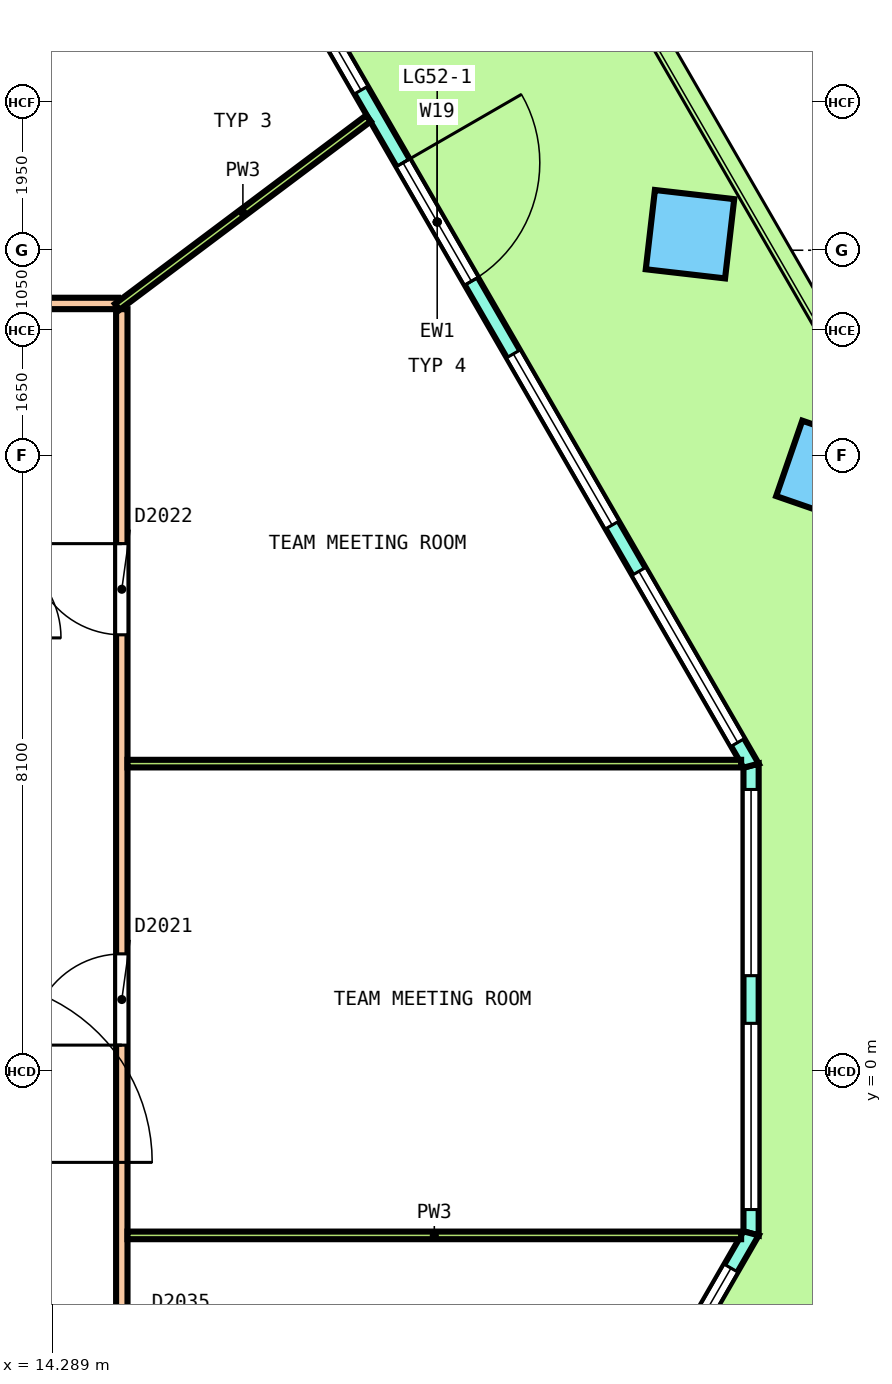
"""IFC4 building model, lengths in metres.
Left out: names, types, materials, properties, quantities, classifications, styles, units other than length and angle.
Written with IfcOpenShell. Run it as: python <this file> out.ifc"""

import sys

from ifc_helpers import new_model, si_unit, direction, frame, frame_2d, origin, origin_2d, place, context, subcontext, project, spatial, polyline, rectangle, outline, extrude, element, fill, save


model = new_model("IFC4")
c1 = context("Model", 3, precision=1e-05, world=origin(), true_north=direction((0.0, 1.0)))
c2 = subcontext(c1, "Body", "Model", "MODEL_VIEW")
j1 = project(units=[si_unit("LENGTHUNIT", "METRE"), si_unit("PLANEANGLEUNIT", "RADIAN")], contexts=[c1])
p1 = place(None, origin())
s1 = spatial("IfcSite", under=j1, at=p1, CompositionType="ELEMENT")
p2 = place(p1, origin())
s2 = spatial("IfcBuilding", under=s1, at=p2, CompositionType="ELEMENT")
p3 = place(p2, frame((0.0, 0.0, 241.4)))
s3 = spatial("IfcBuildingStorey", under=s2, at=p3, CompositionType="ELEMENT", Elevation=241.4)
p4 = place(p3, frame((24.477, 7.89, 0.0), z_axis=(0.021792529504, 0.025068093754, 0.999448185917), x_axis=(-0.49894916392, 0.866563260977, -0.010855715031)))
e1 = element("IfcColumn", 1, at=p4, inside=s3, PredefinedType="COLUMN", context=c2, shape_type="SweptSolid", body=[
    extrude(rectangle(XDim=1.05, YDim=1.05, at=origin_2d()), origin(), (0.0, 0.0, 1.0), 3.652),
])
p5 = place(p3, frame((22.675, 11.011, 0.0), z_axis=(0.025336830513, 0.018852206345, 0.999501195265), x_axis=(-0.501175751069, 0.865337958787, -0.003617128936)))
e2 = element("IfcColumn", 2, at=p5, inside=s3, PredefinedType="COLUMN", context=c2, shape_type="SweptSolid", body=[
    extrude(rectangle(XDim=1.05, YDim=1.05, at=origin_2d()), origin(), (0.0, 0.0, 1.0), 3.652),
])
p6 = place(p3, frame((23.479, -2.134, 0.0), z_axis=(0.0, 0.0, 1.0), x_axis=(0.0, 1.0, 0.0)))
e3 = element("IfcWall", 3, at=p6, inside=s3, PredefinedType="SOLIDWALL", context=c2, shape_type="SweptSolid", body=[
    extrude(outline(polyline([(-0.027, -0.1), (1.008, -0.1), (2.042, -0.1), (3.077, -0.1), (4.111, -0.1), (5.146, -0.1), (6.18, -0.1), (6.126, 0.1), (5.11, 0.1), (4.093, 0.1), (3.077, 0.1), (2.06, 0.1), (1.043, 0.1), (0.027, 0.1), (-0.027, -0.1)])), origin(), (0.0, 0.0, 1.0), 3.7),
])
p7 = place(p6, frame((0.313, 0.0, 0.1)))
e4 = element("IfcOpeningElement", 4, at=p7, cuts=e3, PredefinedType="OPENING", context=c2, shape_type="SweptSolid", body=[
    extrude(rectangle(XDim=2.45, YDim=2.65, at=frame_2d((1.225, 1.325))), frame((0.0, 0.11, 0.0), z_axis=(0.0, -1.0, 0.0), x_axis=(1.0, 0.0, 0.0)), (0.0, 0.0, 1.0), 0.22),
])
p8 = place(p6, frame((3.39, 0.0, 0.1)))
e5 = element("IfcOpeningElement", 5, at=p8, cuts=e3, PredefinedType="OPENING", context=c2, shape_type="SweptSolid", body=[
    extrude(rectangle(XDim=2.45, YDim=2.65, at=frame_2d((1.225, 1.325))), frame((0.0, 0.11, 0.0), z_axis=(0.0, -1.0, 0.0), x_axis=(1.0, 0.0, 0.0)), (0.0, 0.0, 1.0), 0.22),
])
p9 = place(p3, frame((23.479, 4.019, 0.0), z_axis=(0.0, 0.0, 1.0), x_axis=(-0.500000529106, 0.866025098304, 0.0)))
e6 = element("IfcWall", 6, at=p9, inside=s3, PredefinedType="SOLIDWALL", context=c2, shape_type="SweptSolid", body=[
    extrude(outline(polyline([(-0.027, -0.1), (1.009, -0.1), (2.044, -0.1), (3.08, -0.1), (4.116, -0.1), (5.152, -0.1), (6.187, -0.1), (7.223, -0.1), (8.259, -0.1), (9.294, -0.1), (10.33, -0.1), (11.365, -0.1), (12.401, -0.1), (13.437, -0.1), (14.473, -0.1), (15.508, -0.1), (16.544, -0.1), (16.49, 0.1), (15.461, 0.1), (14.432, 0.1), (13.403, 0.1), (12.375, 0.1), (11.345, 0.1), (10.316, 0.1), (9.288, 0.1), (8.259, 0.1), (7.229, 0.1), (6.201, 0.1), (5.172, 0.1), (4.143, 0.1), (3.114, 0.1), (2.085, 0.1), (1.056, 0.1), (0.027, 0.1), (-0.027, -0.1)])), origin(), (0.0, 0.0, 1.0), 3.7),
])
p10 = place(p9, frame((0.352, 0.0, 0.1)))
e7 = element("IfcOpeningElement", 7, at=p10, cuts=e6, PredefinedType="OPENING", context=c2, shape_type="SweptSolid", body=[
    extrude(rectangle(XDim=2.6, YDim=2.65, at=frame_2d((1.3, 1.325))), frame((0.0, 0.11, 0.0), z_axis=(0.0, -1.0, 0.0), x_axis=(1.0, 0.0, 0.0)), (0.0, 0.0, 1.0), 0.22),
])
p11 = place(p9, frame((3.655, 0.0, 0.1)))
e8 = element("IfcOpeningElement", 8, at=p11, cuts=e6, PredefinedType="OPENING", context=c2, shape_type="SweptSolid", body=[
    extrude(rectangle(XDim=2.6, YDim=2.65, at=frame_2d((1.3, 1.325))), frame((0.0, 0.11, 0.0), z_axis=(0.0, -1.0, 0.0), x_axis=(1.0, 0.0, 0.0)), (0.0, 0.0, 1.0), 0.22),
])
p12 = place(p9, frame((7.359, 0.0, 0.0)))
e9 = element("IfcOpeningElement", 9, at=p12, cuts=e6, PredefinedType="OPENING", context=c2, shape_type="SweptSolid", body=[
    extrude(rectangle(XDim=1.8, YDim=2.4, at=frame_2d((0.9, 1.2))), frame((0.0, 0.11, 0.0), z_axis=(0.0, -1.0, 0.0), x_axis=(1.0, 0.0, 0.0)), (0.0, 0.0, 1.0), 0.22),
])
p13 = place(p9, frame((7.359, 0.0, 2.55)))
e10 = element("IfcOpeningElement", 10, at=p13, cuts=e6, PredefinedType="OPENING", context=c2, shape_type="SweptSolid", body=[
    extrude(rectangle(XDim=1.8, YDim=0.2, at=frame_2d((0.9, 0.1))), frame((0.0, 0.11, 0.0), z_axis=(0.0, -1.0, 0.0), x_axis=(1.0, 0.0, 0.0)), (0.0, 0.0, 1.0), 0.22),
])
p14 = place(p9, frame((10.262, 0.0, 0.1)))
e11 = element("IfcOpeningElement", 11, at=p14, cuts=e6, PredefinedType="OPENING", context=c2, shape_type="SweptSolid", body=[
    extrude(rectangle(XDim=2.6, YDim=2.65, at=frame_2d((1.3, 1.325))), frame((0.0, 0.11, 0.0), z_axis=(0.0, -1.0, 0.0), x_axis=(1.0, 0.0, 0.0)), (0.0, 0.0, 1.0), 0.22),
])
p15 = place(p9, frame((13.565, 0.0, 0.1)))
e12 = element("IfcOpeningElement", 12, at=p15, cuts=e6, PredefinedType="OPENING", context=c2, shape_type="SweptSolid", body=[
    extrude(rectangle(XDim=2.6, YDim=2.65, at=frame_2d((1.3, 1.325))), frame((0.0, 0.11, 0.0), z_axis=(0.0, -1.0, 0.0), x_axis=(1.0, 0.0, 0.0)), (0.0, 0.0, 1.0), 0.22),
])
p16 = place(p3, frame((13.587, -19.266, 0.0), z_axis=(0.0, 0.0, 1.0), x_axis=(0.500004117472, 0.866023026548, 0.0)))
e13 = element("IfcWall", 13, at=p16, inside=s3, PredefinedType="SOLIDWALL", context=c2, shape_type="SweptSolid", body=[
    extrude(outline(polyline([(-0.027, -0.1), (1.017, -0.1), (2.061, -0.1), (3.105, -0.1), (4.149, -0.1), (5.193, -0.1), (6.237, -0.1), (7.281, -0.1), (8.325, -0.1), (9.369, -0.1), (10.414, -0.1), (11.458, -0.1), (12.501, -0.1), (13.546, -0.1), (14.59, -0.1), (15.634, -0.1), (16.678, -0.1), (17.722, -0.1), (18.766, -0.1), (19.81, -0.1), (19.756, 0.1), (18.718, 0.1), (17.679, 0.1), (16.641, 0.1), (15.603, 0.1), (14.564, 0.1), (13.526, 0.1), (12.488, 0.1), (11.449, 0.1), (10.411, 0.1), (9.372, 0.1), (8.334, 0.1), (7.295, 0.1), (6.257, 0.1), (5.219, 0.1), (4.18, 0.1), (3.142, 0.1), (2.104, 0.1), (1.065, 0.1), (0.027, 0.1), (-0.027, -0.1)])), origin(), (0.0, 0.0, 1.0), 3.7),
])
p17 = place(p16, frame((0.528, 0.0, 0.1)))
e14 = element("IfcOpeningElement", 14, at=p17, cuts=e13, PredefinedType="OPENING", context=c2, shape_type="SweptSolid", body=[
    extrude(rectangle(XDim=2.9, YDim=2.65, at=frame_2d((1.45, 1.325))), frame((0.0, 0.11, 0.0), z_axis=(0.0, -1.0, 0.0), x_axis=(1.0, 0.0, 0.0)), (0.0, 0.0, 1.0), 0.22),
])
p18 = place(p16, frame((4.485, 0.0, 0.1)))
e15 = element("IfcOpeningElement", 15, at=p18, cuts=e13, PredefinedType="OPENING", context=c2, shape_type="SweptSolid", body=[
    extrude(rectangle(XDim=2.9, YDim=2.65, at=frame_2d((1.45, 1.325))), frame((0.0, 0.11, 0.0), z_axis=(0.0, -1.0, 0.0), x_axis=(1.0, 0.0, 0.0)), (0.0, 0.0, 1.0), 0.22),
])
p19 = place(p16, frame((8.991, 0.0, 0.0)))
e16 = element("IfcOpeningElement", 16, at=p19, cuts=e13, PredefinedType="OPENING", context=c2, shape_type="SweptSolid", body=[
    extrude(rectangle(XDim=1.8, YDim=2.4, at=frame_2d((0.9, 1.2))), frame((0.0, 0.11, 0.0), z_axis=(0.0, -1.0, 0.0), x_axis=(1.0, 0.0, 0.0)), (0.0, 0.0, 1.0), 0.22),
])
p20 = place(p16, frame((8.991, 0.0, 2.55)))
e17 = element("IfcOpeningElement", 17, at=p20, cuts=e13, PredefinedType="OPENING", context=c2, shape_type="SweptSolid", body=[
    extrude(rectangle(XDim=1.8, YDim=0.2, at=frame_2d((0.9, 0.1))), frame((0.0, 0.11, 0.0), z_axis=(0.0, -1.0, 0.0), x_axis=(1.0, 0.0, 0.0)), (0.0, 0.0, 1.0), 0.22),
])
p21 = place(p16, frame((12.398, 0.0, 0.1)))
e18 = element("IfcOpeningElement", 18, at=p21, cuts=e13, PredefinedType="OPENING", context=c2, shape_type="SweptSolid", body=[
    extrude(rectangle(XDim=2.9, YDim=2.65, at=frame_2d((1.45, 1.325))), frame((0.0, 0.11, 0.0), z_axis=(0.0, -1.0, 0.0), x_axis=(1.0, 0.0, 0.0)), (0.0, 0.0, 1.0), 0.22),
])
p22 = place(p16, frame((16.355, 0.0, 0.1)))
e19 = element("IfcOpeningElement", 19, at=p22, cuts=e13, PredefinedType="OPENING", context=c2, shape_type="SweptSolid", body=[
    extrude(rectangle(XDim=2.9, YDim=2.65, at=frame_2d((1.45, 1.325))), frame((0.0, 0.11, 0.0), z_axis=(0.0, -1.0, 0.0), x_axis=(1.0, 0.0, 0.0)), (0.0, 0.0, 1.0), 0.22),
])
p23 = place(p3, frame((15.2, -7.075, 0.0), z_axis=(0.0, 0.0, 1.0), x_axis=(0.0, 1.0, 0.0)))
e20 = element("IfcWall", 20, at=p23, inside=s3, PredefinedType="PARTITIONING", context=c2, shape_type="SweptSolid", body=[
    extrude(rectangle(XDim=17.1, YDim=0.15, at=frame_2d((8.55, 0.0))), origin(), (0.0, 0.0, 1.0), 2.8),
])
p24 = place(p23, frame((7.418, 0.0, 0.0)))
e21 = element("IfcOpeningElement", 21, at=p24, cuts=e20, PredefinedType="OPENING", context=c2, shape_type="SweptSolid", body=[
    extrude(rectangle(XDim=1.2, YDim=2.1, at=frame_2d((0.6, 1.05))), frame((0.0, 0.085, 0.0), z_axis=(0.0, -1.0, 0.0), x_axis=(1.0, 0.0, 0.0)), (0.0, 0.0, 1.0), 0.17),
])
p25 = place(p23, frame((12.815, 0.0, 0.0)))
e22 = element("IfcOpeningElement", 22, at=p25, cuts=e20, PredefinedType="OPENING", context=c2, shape_type="SweptSolid", body=[
    extrude(rectangle(XDim=1.2, YDim=2.1, at=frame_2d((0.6, 1.05))), frame((0.0, 0.085, 0.0), z_axis=(0.0, -1.0, 0.0), x_axis=(1.0, 0.0, 0.0)), (0.0, 0.0, 1.0), 0.17),
])
p26 = place(p23, frame((2.742, 0.0, 0.0)))
e23 = element("IfcOpeningElement", 23, at=p26, cuts=e20, PredefinedType="OPENING", context=c2, shape_type="SweptSolid", body=[
    extrude(rectangle(XDim=1.0, YDim=2.1, at=frame_2d((0.5, 1.05))), frame((0.0, 0.085, 0.0), z_axis=(0.0, -1.0, 0.0), x_axis=(1.0, 0.0, 0.0)), (0.0, 0.0, 1.0), 0.17),
])
p27 = place(p3, frame((-15.125, 10.1, 0.0), z_axis=(0.0, 0.0, 1.0), x_axis=(1.0, 0.0, 0.0)))
e24 = element("IfcWall", 24, at=p27, inside=s3, PredefinedType="PARTITIONING", context=c2, shape_type="SweptSolid", body=[
    extrude(rectangle(XDim=30.275, YDim=0.15, at=frame_2d((15.137, 0.0))), origin(), (0.0, 0.0, 1.0), 2.8),
])
p28 = place(p27, frame((28.08, 0.0, 0.0)))
e25 = element("IfcOpeningElement", 25, at=p28, cuts=e24, PredefinedType="OPENING", context=c2, shape_type="SweptSolid", body=[
    extrude(rectangle(XDim=1.0, YDim=2.1, at=frame_2d((0.5, 1.05))), frame((0.0, 0.085, 0.0), z_axis=(0.0, -1.0, 0.0), x_axis=(1.0, 0.0, 0.0)), (0.0, 0.0, 1.0), 0.17),
])
p29 = place(p27, frame((21.143, 0.0, 0.0)))
e26 = element("IfcOpeningElement", 26, at=p29, cuts=e24, PredefinedType="OPENING", context=c2, shape_type="SweptSolid", body=[
    extrude(rectangle(XDim=1.0, YDim=2.1, at=frame_2d((0.5, 1.05))), frame((0.0, 0.085, 0.0), z_axis=(0.0, -1.0, 0.0), x_axis=(1.0, 0.0, 0.0)), (0.0, 0.0, 1.0), 0.17),
])
p30 = place(p27, frame((4.236, 0.0, 0.0)))
e27 = element("IfcOpeningElement", 27, at=p30, cuts=e24, PredefinedType="OPENING", context=c2, shape_type="SweptSolid", body=[
    extrude(rectangle(XDim=1.2, YDim=2.1, at=frame_2d((0.6, 1.05))), frame((0.0, 0.085, 0.0), z_axis=(0.0, -1.0, 0.0), x_axis=(1.0, 0.0, 0.0)), (0.0, 0.0, 1.0), 0.17),
])
for number, where, z_axis, x_axis in (
    (28, (15.275, 4.046, 0.0), (0.0, 0.0, 1.0), (1.0, 0.0, 0.0)),
    (29, (15.275, -2.16, 0.0), (0.0, 0.0, 1.0), (1.0, 0.0, 0.0)),
):
    element("IfcWall", number, at=place(p3, frame(where, z_axis=z_axis, x_axis=x_axis)), inside=s3, PredefinedType="PARTITIONING", context=c2, shape_type="SweptSolid", body=[
        extrude(rectangle(XDim=8.073, YDim=0.1, at=frame_2d((4.037, 0.0))), origin(), (0.0, 0.0, 1.0), 2.8),
    ])
p31 = place(p3, frame((15.14, 10.055, 0.0), z_axis=(0.0, 0.0, 1.0), x_axis=(0.799893673581, 0.600141742395, 0.0)))
e30 = element("IfcWall", 30, at=p31, inside=s3, PredefinedType="PARTITIONING", context=c2, shape_type="SweptSolid", body=[
    extrude(rectangle(XDim=4.134, YDim=0.1, at=frame_2d((2.067, 0.0))), origin(), (0.0, 0.0, 1.0), 2.8),
])
p32 = place(p7, origin())
e31 = element("IfcWindow", 31, at=p32, inside=s3, PartitioningType="SINGLE_PANEL", PredefinedType="WINDOW", context=c2, shape_type="SweptSolid", body=[
    extrude(rectangle(XDim=2.45, YDim=2.65, at=frame_2d((1.225, 1.325))), frame((0.0, 0.03, 0.0), z_axis=(0.0, -1.0, 0.0), x_axis=(1.0, 0.0, 0.0)), (0.0, 0.0, 1.0), 0.06),
])
fill(e4, e31)
p33 = place(p8, origin())
e32 = element("IfcWindow", 32, at=p33, inside=s3, PartitioningType="SINGLE_PANEL", PredefinedType="WINDOW", context=c2, shape_type="SweptSolid", body=[
    extrude(rectangle(XDim=2.45, YDim=2.65, at=frame_2d((1.225, 1.325))), frame((0.0, 0.03, 0.0), z_axis=(0.0, -1.0, 0.0), x_axis=(1.0, 0.0, 0.0)), (0.0, 0.0, 1.0), 0.06),
])
fill(e5, e32)
p34 = place(p10, origin())
e33 = element("IfcWindow", 33, at=p34, inside=s3, PartitioningType="SINGLE_PANEL", PredefinedType="WINDOW", context=c2, shape_type="SweptSolid", body=[
    extrude(rectangle(XDim=2.6, YDim=2.65, at=frame_2d((1.3, 1.325))), frame((0.0, 0.03, 0.0), z_axis=(0.0, -1.0, 0.0), x_axis=(1.0, 0.0, 0.0)), (0.0, 0.0, 1.0), 0.06),
])
fill(e7, e33)
p35 = place(p11, origin())
e34 = element("IfcWindow", 34, at=p35, inside=s3, PartitioningType="SINGLE_PANEL", PredefinedType="WINDOW", context=c2, shape_type="SweptSolid", body=[
    extrude(rectangle(XDim=2.6, YDim=2.65, at=frame_2d((1.3, 1.325))), frame((0.0, 0.03, 0.0), z_axis=(0.0, -1.0, 0.0), x_axis=(1.0, 0.0, 0.0)), (0.0, 0.0, 1.0), 0.06),
])
fill(e8, e34)
p36 = place(p12, origin())
e35 = element("IfcDoor", 35, at=p36, inside=s3, OperationType="DOUBLE_DOOR_SINGLE_SWING", PredefinedType="DOOR", context=c2, shape_type="SweptSolid", body=[
    extrude(rectangle(XDim=1.8, YDim=2.4, at=frame_2d((0.9, 1.2))), frame((0.0, 0.025, 0.0), z_axis=(0.0, -1.0, 0.0), x_axis=(1.0, 0.0, 0.0)), (0.0, 0.0, 1.0), 0.05),
])
fill(e9, e35)
p37 = place(p13, origin())
e36 = element("IfcWindow", 36, at=p37, inside=s3, PartitioningType="SINGLE_PANEL", PredefinedType="WINDOW", context=c2, shape_type="SweptSolid", body=[
    extrude(rectangle(XDim=1.8, YDim=0.2, at=frame_2d((0.9, 0.1))), frame((0.0, 0.03, 0.0), z_axis=(0.0, -1.0, 0.0), x_axis=(1.0, 0.0, 0.0)), (0.0, 0.0, 1.0), 0.06),
])
fill(e10, e36)
p38 = place(p14, origin())
e37 = element("IfcWindow", 37, at=p38, inside=s3, PartitioningType="SINGLE_PANEL", PredefinedType="WINDOW", context=c2, shape_type="SweptSolid", body=[
    extrude(rectangle(XDim=2.6, YDim=2.65, at=frame_2d((1.3, 1.325))), frame((0.0, 0.03, 0.0), z_axis=(0.0, -1.0, 0.0), x_axis=(1.0, 0.0, 0.0)), (0.0, 0.0, 1.0), 0.06),
])
fill(e11, e37)
p39 = place(p22, origin())
e38 = element("IfcWindow", 38, at=p39, inside=s3, PartitioningType="SINGLE_PANEL", PredefinedType="WINDOW", context=c2, shape_type="SweptSolid", body=[
    extrude(rectangle(XDim=2.9, YDim=2.65, at=frame_2d((1.45, 1.325))), frame((0.0, 0.03, 0.0), z_axis=(0.0, -1.0, 0.0), x_axis=(1.0, 0.0, 0.0)), (0.0, 0.0, 1.0), 0.06),
])
fill(e19, e38)
p40 = place(p24, origin())
e39 = element("IfcDoor", 39, at=p40, inside=s3, OperationType="DOUBLE_DOOR_SINGLE_SWING", PredefinedType="DOOR", context=c2, shape_type="SweptSolid", body=[
    extrude(rectangle(XDim=1.2, YDim=2.1, at=frame_2d((0.6, 1.05))), frame((0.0, 0.025, 0.0), z_axis=(0.0, -1.0, 0.0), x_axis=(1.0, 0.0, 0.0)), (0.0, 0.0, 1.0), 0.05),
])
fill(e21, e39)
p41 = place(p25, origin())
e40 = element("IfcDoor", 40, at=p41, inside=s3, OperationType="DOUBLE_DOOR_SINGLE_SWING", PredefinedType="DOOR", context=c2, shape_type="SweptSolid", body=[
    extrude(rectangle(XDim=1.2, YDim=2.1, at=frame_2d((0.6, 1.05))), frame((0.0, 0.025, 0.0), z_axis=(0.0, -1.0, 0.0), x_axis=(1.0, 0.0, 0.0)), (0.0, 0.0, 1.0), 0.05),
])
fill(e22, e40)
save(model, sys.argv[1])
